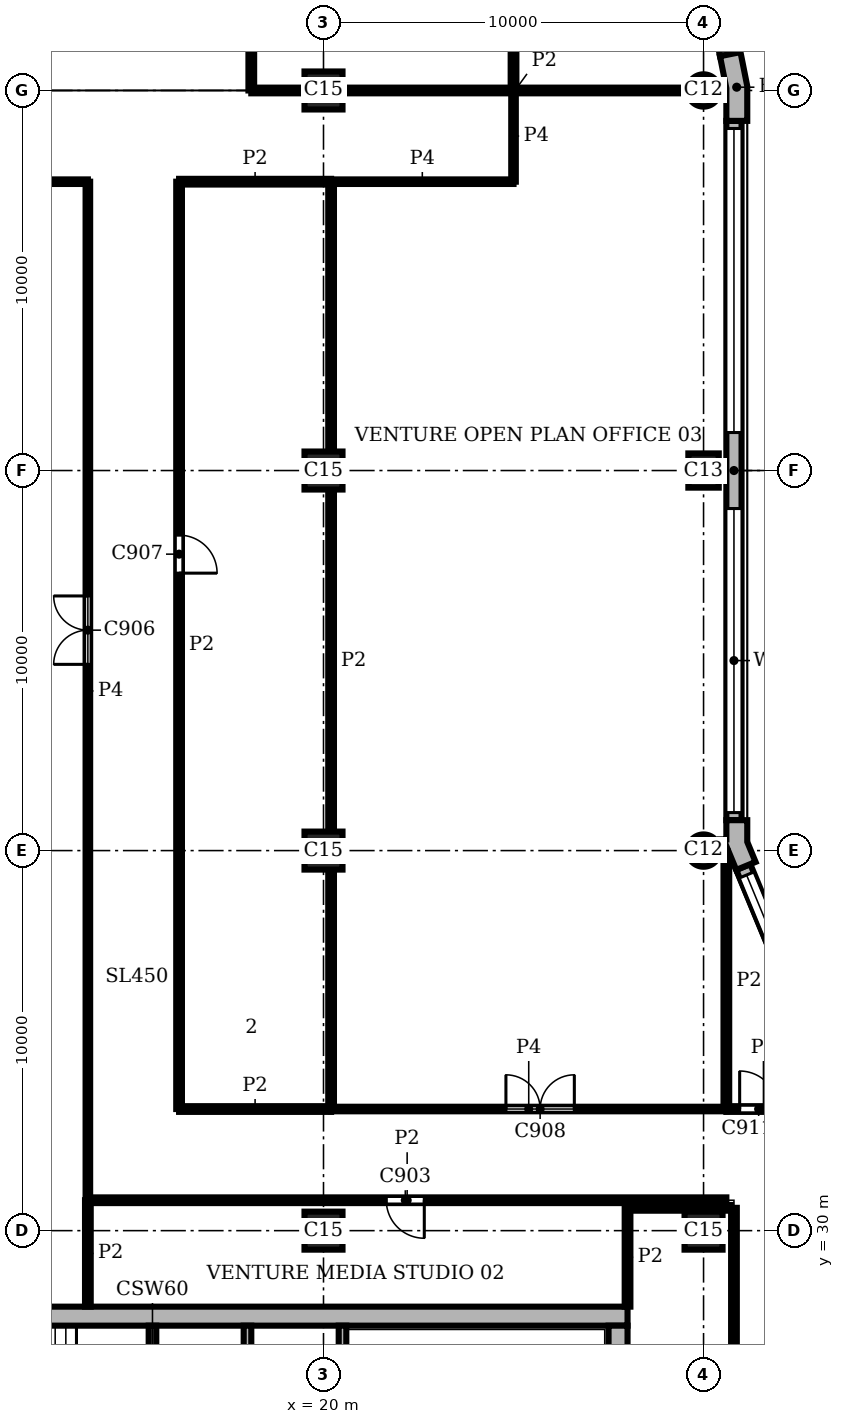
"""IFC4 building model, lengths in metres.
Left out: names, types, materials, properties, quantities, classifications, styles, units other than length and angle.
Written with IfcOpenShell. Run it as: python <this file> out.ifc"""

import sys

from ifc_helpers import new_model, si_unit, direction, frame, frame_2d, origin, origin_2d, place, context, subcontext, project, spatial, polyline, rectangle, circle, outline, extrude, element, fill, save


model = new_model("IFC4")
c1 = context("Model", 3, precision=1e-05, world=origin(), true_north=direction((0.0, 1.0)))
c2 = subcontext(c1, "Body", "Model", "MODEL_VIEW")
j1 = project(units=[si_unit("LENGTHUNIT", "METRE"), si_unit("PLANEANGLEUNIT", "RADIAN")], contexts=[c1])
p1 = place(None, origin())
s1 = spatial("IfcSite", under=j1, at=p1, CompositionType="ELEMENT")
p2 = place(p1, origin())
s2 = spatial("IfcBuilding", under=s1, at=p2, CompositionType="ELEMENT")
p3 = place(p2, frame((0.0, 0.0, 333.3)))
s3 = spatial("IfcBuildingStorey", under=s2, at=p3, CompositionType="ELEMENT", Elevation=333.3)
p4 = place(p3, frame((30.0, 40.0, 0.0), z_axis=(0.0, 0.0, 1.0), x_axis=(1.0, 0.0, 0.0)))
e1 = element("IfcColumn", 1, at=p4, inside=s3, PredefinedType="COLUMN", context=c2, shape_type="SweptSolid", body=[
    extrude(circle(Radius=0.425, at=origin_2d()), origin(), (0.0, 0.0, 1.0), 3.9),
])
p5 = place(p3, frame((30.0, 50.0, 0.0), z_axis=(0.0, 0.0, 1.0), x_axis=(0.0, 1.0, 0.0)))
e2 = element("IfcColumn", 2, at=p5, inside=s3, PredefinedType="COLUMN", context=c2, shape_type="SweptSolid", body=[
    extrude(rectangle(XDim=0.9, YDim=0.8, at=origin_2d()), origin(), (0.0, 0.0, 1.0), 3.9),
])
p6 = place(p3, frame((30.0, 60.0, 0.0), z_axis=(0.0, 0.0, 1.0), x_axis=(1.0, 0.0, 0.0)))
e3 = element("IfcColumn", 3, at=p6, inside=s3, PredefinedType="COLUMN", context=c2, shape_type="SweptSolid", body=[
    extrude(circle(Radius=0.425, at=origin_2d()), origin(), (0.0, 0.0, 1.0), 3.9),
])
for number, where, z_axis, x_axis in (
    (4, (20.0, 30.0, 0.0), (0.0, 0.0, 1.0), (1.0, 0.0, 0.0)),
    (5, (20.0, 40.0, 0.0), (0.0, 0.0, 1.0), (1.0, 0.0, 0.0)),
    (6, (20.0, 50.0, 0.0), (0.0, 0.0, 1.0), (1.0, 0.0, 0.0)),
    (7, (20.0, 60.0, 0.0), (0.0, 0.0, 1.0), (1.0, 0.0, 0.0)),
    (8, (30.0, 30.0, 0.0), (0.0, 0.0, 1.0), (1.0, 0.0, 0.0)),
):
    element("IfcColumn", number, at=place(p3, frame(where, z_axis=z_axis, x_axis=x_axis)), inside=s3, PredefinedType="COLUMN", context=c2, shape_type="SweptSolid", body=[
        extrude(rectangle(XDim=1.0, YDim=1.0, at=origin_2d()), origin(), (0.0, 0.0, 1.0), 3.9),
    ])
p7 = place(p3, frame((27.75, 8.5, 0.0), z_axis=(0.0, 0.0, 1.0), x_axis=(0.0, 1.0, 0.0)))
e9 = element("IfcWall", 9, at=p7, inside=s3, PredefinedType="SHEAR", context=c2, shape_type="SweptSolid", body=[
    extrude(rectangle(XDim=19.0, YDim=0.5, at=frame_2d((9.5, 0.0))), origin(), (0.0, 0.0, 1.0), 3.9),
])
p8 = place(p7, frame((4.95, 0.0, 0.0)))
e10 = element("IfcOpeningElement", 10, at=p8, cuts=e9, PredefinedType="OPENING", context=c2, shape_type="SweptSolid", body=[
    extrude(rectangle(XDim=1.6, YDim=2.1, at=frame_2d((0.8, 1.05))), frame((0.0, 0.26, 0.0), z_axis=(0.0, -1.0, 0.0), x_axis=(1.0, 0.0, 0.0)), (0.0, 0.0, 1.0), 0.52),
])
p9 = place(p3, frame((28.0, 27.75, 0.0), z_axis=(0.0, 0.0, 1.0), x_axis=(-1.0, 0.0, 0.0)))
e11 = element("IfcWall", 11, at=p9, inside=s3, PredefinedType="SHEAR", context=c2, shape_type="SweptSolid", body=[
    extrude(rectangle(XDim=20.0, YDim=0.5, at=frame_2d((10.0, 0.0))), origin(), (0.0, 0.0, 1.0), 3.9),
])
p10 = place(p3, origin())
e12 = element("IfcWall", 12, at=p10, inside=s3, PredefinedType="SOLIDWALL", context=c2, shape_type="SweptSolid", body=[
    extrude(outline(polyline([(30.62, 39.995), (30.62, 40.071), (30.861, 39.49), (31.23, 39.644), (31.369, 39.701), (31.15, 40.229), (31.15, 40.8), (31.0, 40.8), (30.6, 40.8), (30.6, 40.295), (30.425, 40.295), (30.425, 39.995), (30.62, 39.995)])), origin(), (0.0, 0.0, 1.0), 3.9),
])
e13 = element("IfcWall", 13, at=p10, inside=s3, PredefinedType="SOLIDWALL", context=c2, shape_type="SweptSolid", body=[
    extrude(outline(polyline([(31.0, 59.2), (31.15, 59.2), (31.15, 60.113), (30.972, 61.009), (30.825, 60.98), (30.432, 60.902), (30.6, 60.059), (30.6, 59.2), (31.0, 59.2)])), origin(), (0.0, 0.0, 1.0), 3.9),
])
p11 = place(p3, frame((33.362, 33.974, 0.0), z_axis=(0.0, 0.0, 1.0), x_axis=(-0.382655745237, 0.923891000409, 0.0)))
e14 = element("IfcWall", 14, at=p11, inside=s3, PredefinedType="SOLIDWALL", context=c2, shape_type="SweptSolid", body=[
    extrude(rectangle(XDim=6.053, YDim=0.4, at=frame_2d((3.027, 0.0))), origin(), (0.0, 0.0, 1.0), 3.9),
])
p12 = place(p11, frame((0.227, 0.0, 0.9)))
e15 = element("IfcOpeningElement", 15, at=p12, cuts=e14, PredefinedType="OPENING", context=c2, shape_type="SweptSolid", body=[
    extrude(rectangle(XDim=5.6, YDim=2.35, at=frame_2d((2.8, 1.175))), frame((0.0, 0.21, 0.0), z_axis=(0.0, -1.0, 0.0), x_axis=(1.0, 0.0, 0.0)), (0.0, 0.0, 1.0), 0.42),
])
p13 = place(p3, frame((30.8, 40.8, 0.0), z_axis=(0.0, 0.0, 1.0), x_axis=(0.0, 1.0, 0.0)))
e16 = element("IfcWall", 16, at=p13, inside=s3, PredefinedType="SOLIDWALL", context=c2, shape_type="SweptSolid", body=[
    extrude(rectangle(XDim=18.4, YDim=0.4, at=frame_2d((9.2, 0.0))), origin(), (0.0, 0.0, 1.0), 3.9),
])
p14 = place(p13, frame((0.2, 0.0, 0.9)))
e17 = element("IfcOpeningElement", 17, at=p14, cuts=e16, PredefinedType="OPENING", context=c2, shape_type="SweptSolid", body=[
    extrude(rectangle(XDim=8.0, YDim=2.35, at=frame_2d((4.0, 1.175))), frame((0.0, 0.21, 0.0), z_axis=(0.0, -1.0, 0.0), x_axis=(1.0, 0.0, 0.0)), (0.0, 0.0, 1.0), 0.42),
])
p15 = place(p13, frame((10.2, 0.0, 0.9)))
e18 = element("IfcOpeningElement", 18, at=p15, cuts=e16, PredefinedType="OPENING", context=c2, shape_type="SweptSolid", body=[
    extrude(rectangle(XDim=8.0, YDim=2.35, at=frame_2d((4.0, 1.175))), frame((0.0, 0.21, 0.0), z_axis=(0.0, -1.0, 0.0), x_axis=(1.0, 0.0, 0.0)), (0.0, 0.0, 1.0), 0.42),
])
p16 = place(p3, frame((30.629, 60.941, 0.0), z_axis=(0.0, 0.0, 1.0), x_axis=(-0.195098533057, 0.98078364709, 0.0)))
e19 = element("IfcWall", 19, at=p16, inside=s3, PredefinedType="SOLIDWALL", context=c2, shape_type="SweptSolid", body=[
    extrude(rectangle(XDim=4.753, YDim=0.4, at=frame_2d((2.376, 0.0))), origin(), (0.0, 0.0, 1.0), 3.9),
])
p17 = place(p16, frame((0.226, 0.0, 0.9)))
e20 = element("IfcOpeningElement", 20, at=p17, cuts=e19, PredefinedType="OPENING", context=c2, shape_type="SweptSolid", body=[
    extrude(rectangle(XDim=4.3, YDim=2.35, at=frame_2d((2.15, 1.175))), frame((0.0, 0.21, 0.0), z_axis=(0.0, -1.0, 0.0), x_axis=(1.0, 0.0, 0.0)), (0.0, 0.0, 1.0), 0.42),
])
p18 = place(p3, frame((15.5, 23.6, 0.0), z_axis=(0.0, 0.0, 1.0), x_axis=(0.0, 1.0, 0.0)))
e21 = element("IfcWall", 21, at=p18, inside=s3, PredefinedType="SHEAR", context=c2, shape_type="SweptSolid", body=[
    extrude(rectangle(XDim=3.9, YDim=0.2, at=frame_2d((1.95, 0.0))), origin(), (0.0, 0.0, 1.0), 3.58),
])
p19 = place(p3, frame((18.0, 20.0, 0.0), z_axis=(0.0, 0.0, 1.0), x_axis=(0.0, 1.0, 0.0)))
e22 = element("IfcWall", 22, at=p19, inside=s3, PredefinedType="SHEAR", context=c2, shape_type="SweptSolid", body=[
    extrude(rectangle(XDim=7.5, YDim=0.2, at=frame_2d((3.75, 0.0))), origin(), (0.0, 0.0, 1.0), 3.58),
])
p20 = place(p19, frame((1.2, 0.0, 0.0)))
e23 = element("IfcOpeningElement", 23, at=p20, cuts=e22, PredefinedType="OPENING", context=c2, shape_type="SweptSolid", body=[
    extrude(rectangle(XDim=1.2, YDim=2.1, at=frame_2d((0.6, 1.05))), frame((0.0, 0.11, 0.0), z_axis=(0.0, -1.0, 0.0), x_axis=(1.0, 0.0, 0.0)), (0.0, 0.0, 1.0), 0.22),
])
p21 = place(p3, frame((20.5, 23.6, 0.0), z_axis=(0.0, 0.0, 1.0), x_axis=(0.0, 1.0, 0.0)))
e24 = element("IfcWall", 24, at=p21, inside=s3, PredefinedType="SHEAR", context=c2, shape_type="SweptSolid", body=[
    extrude(rectangle(XDim=3.9, YDim=0.2, at=frame_2d((1.95, 0.0))), origin(), (0.0, 0.0, 1.0), 3.58),
])
p22 = place(p3, frame((13.8, 28.0, 0.0), z_axis=(0.0, 0.0, 1.0), x_axis=(0.0, 1.0, 0.0)))
e25 = element("IfcWall", 25, at=p22, inside=s3, PredefinedType="PARTITIONING", context=c2, shape_type="SweptSolid", body=[
    extrude(rectangle(XDim=2.801, YDim=0.15, at=frame_2d((1.4, 0.0))), origin(), (0.0, 0.0, 1.0), 3.58),
])
p23 = place(p3, frame((16.2, 33.2, 0.0), z_axis=(0.0, 0.0, 1.0), x_axis=(0.0, 1.0, 0.0)))
e26 = element("IfcWall", 26, at=p23, inside=s3, PredefinedType="PARTITIONING", context=c2, shape_type="SweptSolid", body=[
    extrude(rectangle(XDim=24.4, YDim=0.15, at=frame_2d((12.2, 0.0))), origin(), (0.0, 0.0, 1.0), 3.58),
])
p24 = place(p23, frame((14.1, 0.0, 0.0)))
e27 = element("IfcOpeningElement", 27, at=p24, cuts=e26, PredefinedType="OPENING", context=c2, shape_type="SweptSolid", body=[
    extrude(rectangle(XDim=1.0, YDim=2.1, at=frame_2d((0.5, 1.05))), frame((0.0, 0.085, 0.0), z_axis=(0.0, -1.0, 0.0), x_axis=(1.0, 0.0, 0.0)), (0.0, 0.0, 1.0), 0.17),
])
p25 = place(p3, frame((18.1, 60.0, 0.0), z_axis=(0.0, 0.0, 1.0), x_axis=(0.0, 1.0, 0.0)))
e28 = element("IfcWall", 28, at=p25, inside=s3, PredefinedType="PARTITIONING", context=c2, shape_type="SweptSolid", body=[
    extrude(rectangle(XDim=6.4, YDim=0.15, at=frame_2d((3.2, 0.0))), origin(), (0.0, 0.0, 1.0), 3.58),
])
p26 = place(p25, frame((3.1, 0.0, 0.0)))
e29 = element("IfcOpeningElement", 29, at=p26, cuts=e28, PredefinedType="OPENING", context=c2, shape_type="SweptSolid", body=[
    extrude(rectangle(XDim=1.0, YDim=2.1, at=frame_2d((0.5, 1.05))), frame((0.0, 0.085, 0.0), z_axis=(0.0, -1.0, 0.0), x_axis=(1.0, 0.0, 0.0)), (0.0, 0.0, 1.0), 0.17),
])
p27 = place(p3, frame((20.2, 33.2, 0.0), z_axis=(0.0, 0.0, 1.0), x_axis=(0.0, 1.0, 0.0)))
e30 = element("IfcWall", 30, at=p27, inside=s3, PredefinedType="PARTITIONING", context=c2, shape_type="SweptSolid", body=[
    extrude(rectangle(XDim=6.3, YDim=0.15, at=frame_2d((3.15, 0.0))), origin(), (0.0, 0.0, 1.0), 3.58),
])
p28 = place(p3, frame((20.2, 40.5, 0.0), z_axis=(0.0, 0.0, 1.0), x_axis=(0.0, 1.0, 0.0)))
e31 = element("IfcWall", 31, at=p28, inside=s3, PredefinedType="PARTITIONING", context=c2, shape_type="SweptSolid", body=[
    extrude(rectangle(XDim=9.0, YDim=0.15, at=frame_2d((4.5, 0.0))), origin(), (0.0, 0.0, 1.0), 3.58),
])
p29 = place(p3, frame((20.2, 50.5, 0.0), z_axis=(0.0, 0.0, 1.0), x_axis=(0.0, 1.0, 0.0)))
e32 = element("IfcWall", 32, at=p29, inside=s3, PredefinedType="PARTITIONING", context=c2, shape_type="SweptSolid", body=[
    extrude(rectangle(XDim=7.1, YDim=0.15, at=frame_2d((3.55, 0.0))), origin(), (0.0, 0.0, 1.0), 3.58),
])
p30 = place(p3, frame((25.0, 60.0, 0.0), z_axis=(0.0, 0.0, 1.0), x_axis=(0.0, 1.0, 0.0)))
e33 = element("IfcWall", 33, at=p30, inside=s3, PredefinedType="PARTITIONING", context=c2, shape_type="SweptSolid", body=[
    extrude(rectangle(XDim=8.0, YDim=0.15, at=frame_2d((4.0, 0.0))), origin(), (0.0, 0.0, 1.0), 3.58),
])
p31 = place(p3, frame((28.0, 28.0, 0.0), z_axis=(0.0, 0.0, 1.0), x_axis=(0.0, 1.0, 0.0)))
e34 = element("IfcWall", 34, at=p31, inside=s3, PredefinedType="PARTITIONING", context=c2, shape_type="SweptSolid", body=[
    extrude(rectangle(XDim=2.598, YDim=0.15, at=frame_2d((1.299, 0.0))), origin(), (0.0, 0.0, 1.0), 3.58),
])
p32 = place(p3, frame((30.6, 33.2, 0.0), z_axis=(0.0, 0.0, 1.0), x_axis=(0.0, 1.0, 0.0)))
e35 = element("IfcWall", 35, at=p32, inside=s3, PredefinedType="PARTITIONING", context=c2, shape_type="SweptSolid", body=[
    extrude(rectangle(XDim=6.738, YDim=0.15, at=frame_2d((3.369, 0.0))), origin(), (0.0, 0.0, 1.0), 3.58),
])
p33 = place(p3, frame((30.8, 15.45, 0.0), z_axis=(0.0, 0.0, 1.0), x_axis=(0.0, 1.0, 0.0)))
e36 = element("IfcWall", 36, at=p33, inside=s3, PredefinedType="PARTITIONING", context=c2, shape_type="SweptSolid", body=[
    extrude(rectangle(XDim=15.15, YDim=0.15, at=frame_2d((7.575, 0.0))), origin(), (0.0, 0.0, 1.0), 3.58),
])
p34 = place(p33, frame((2.35, 0.0, 0.0)))
e37 = element("IfcOpeningElement", 37, at=p34, cuts=e36, PredefinedType="OPENING", context=c2, shape_type="SweptSolid", body=[
    extrude(rectangle(XDim=1.0, YDim=2.1, at=frame_2d((0.5, 1.05))), frame((0.0, 0.085, 0.0), z_axis=(0.0, -1.0, 0.0), x_axis=(1.0, 0.0, 0.0)), (0.0, 0.0, 1.0), 0.17),
])
p35 = place(p33, frame((10.35, 0.0, 0.0)))
e38 = element("IfcOpeningElement", 38, at=p35, cuts=e36, PredefinedType="OPENING", context=c2, shape_type="SweptSolid", body=[
    extrude(rectangle(XDim=1.0, YDim=2.1, at=frame_2d((0.5, 1.05))), frame((0.0, 0.085, 0.0), z_axis=(0.0, -1.0, 0.0), x_axis=(1.0, 0.0, 0.0)), (0.0, 0.0, 1.0), 0.17),
])
p36 = place(p3, frame((28.002, 30.6, 0.0), z_axis=(0.0, 0.0, 1.0), x_axis=(1.0, 0.0, 0.0)))
e39 = element("IfcWall", 39, at=p36, inside=s3, PredefinedType="PARTITIONING", context=c2, shape_type="SweptSolid", body=[
    extrude(rectangle(XDim=2.723, YDim=0.15, at=frame_2d((1.362, 0.0))), origin(), (0.0, 0.0, 1.0), 3.58),
])
p37 = place(p3, frame((13.802, 30.8, 0.0), z_axis=(0.0, 0.0, 1.0), x_axis=(1.0, 0.0, 0.0)))
e40 = element("IfcWall", 40, at=p37, inside=s3, PredefinedType="PARTITIONING", context=c2, shape_type="SweptSolid", body=[
    extrude(rectangle(XDim=16.798, YDim=0.15, at=frame_2d((8.399, 0.0))), origin(), (0.0, 0.0, 1.0), 3.58),
])
p38 = place(p37, frame((7.85, 0.0, 0.0)))
e41 = element("IfcOpeningElement", 41, at=p38, cuts=e40, PredefinedType="OPENING", context=c2, shape_type="SweptSolid", body=[
    extrude(rectangle(XDim=1.0, YDim=2.1, at=frame_2d((0.5, 1.05))), frame((0.0, 0.085, 0.0), z_axis=(0.0, -1.0, 0.0), x_axis=(1.0, 0.0, 0.0)), (0.0, 0.0, 1.0), 0.17),
])
p39 = place(p3, frame((16.2, 33.2, 0.0), z_axis=(0.0, 0.0, 1.0), x_axis=(1.0, 0.0, 0.0)))
e42 = element("IfcWall", 42, at=p39, inside=s3, PredefinedType="PARTITIONING", context=c2, shape_type="SweptSolid", body=[
    extrude(rectangle(XDim=4.0, YDim=0.15, at=frame_2d((2.0, 0.0))), origin(), (0.0, 0.0, 1.0), 3.58),
])
p40 = place(p3, frame((30.6, 33.2, 0.0), z_axis=(0.0, 0.0, 1.0), x_axis=(1.0, 0.0, 0.0)))
e43 = element("IfcWall", 43, at=p40, inside=s3, PredefinedType="PARTITIONING", context=c2, shape_type="SweptSolid", body=[
    extrude(rectangle(XDim=1.952, YDim=0.15, at=frame_2d((0.976, 0.0))), origin(), (0.0, 0.0, 1.0), 3.58),
])
p41 = place(p40, frame((0.35, 0.0, 0.0)))
e44 = element("IfcOpeningElement", 44, at=p41, cuts=e43, PredefinedType="OPENING", context=c2, shape_type="SweptSolid", body=[
    extrude(rectangle(XDim=1.0, YDim=2.1, at=frame_2d((0.5, 1.05))), frame((0.0, 0.085, 0.0), z_axis=(0.0, -1.0, 0.0), x_axis=(1.0, 0.0, 0.0)), (0.0, 0.0, 1.0), 0.17),
])
p42 = place(p3, frame((16.2, 57.6, 0.0), z_axis=(0.0, 0.0, 1.0), x_axis=(1.0, 0.0, 0.0)))
e45 = element("IfcWall", 45, at=p42, inside=s3, PredefinedType="PARTITIONING", context=c2, shape_type="SweptSolid", body=[
    extrude(rectangle(XDim=4.0, YDim=0.15, at=frame_2d((2.0, 0.0))), origin(), (0.0, 0.0, 1.0), 3.58),
])
p43 = place(p3, frame((18.1, 60.0, 0.0), z_axis=(0.0, 0.0, 1.0), x_axis=(1.0, 0.0, 0.0)))
e46 = element("IfcWall", 46, at=p43, inside=s3, PredefinedType="PARTITIONING", context=c2, shape_type="SweptSolid", body=[
    extrude(rectangle(XDim=1.4, YDim=0.15, at=frame_2d((0.7, 0.0))), origin(), (0.0, 0.0, 1.0), 3.58),
])
p44 = place(p3, frame((20.5, 60.0, 0.0), z_axis=(0.0, 0.0, 1.0), x_axis=(1.0, 0.0, 0.0)))
e47 = element("IfcWall", 47, at=p44, inside=s3, PredefinedType="PARTITIONING", context=c2, shape_type="SweptSolid", body=[
    extrude(rectangle(XDim=9.075, YDim=0.15, at=frame_2d((4.538, 0.0))), origin(), (0.0, 0.0, 1.0), 3.58),
])
p45 = place(p3, frame((13.8, 30.8, 0.0), z_axis=(0.0, 0.0, 1.0), x_axis=(0.0, 1.0, 0.0)))
e48 = element("IfcWall", 48, at=p45, inside=s3, PredefinedType="PARTITIONING", context=c2, shape_type="SweptSolid", body=[
    extrude(rectangle(XDim=26.8, YDim=0.12, at=frame_2d((13.4, 0.0))), origin(), (0.0, 0.0, 1.0), 3.58),
])
p46 = place(p45, frame((14.1, 0.0, 0.0)))
e49 = element("IfcOpeningElement", 49, at=p46, cuts=e48, PredefinedType="OPENING", context=c2, shape_type="SweptSolid", body=[
    extrude(rectangle(XDim=1.8, YDim=2.1, at=frame_2d((0.9, 1.05))), frame((0.0, 0.07, 0.0), z_axis=(0.0, -1.0, 0.0), x_axis=(1.0, 0.0, 0.0)), (0.0, 0.0, 1.0), 0.14),
])
p47 = place(p3, frame((25.0, 57.6, 0.0), z_axis=(0.0, 0.0, 1.0), x_axis=(0.0, 1.0, 0.0)))
e50 = element("IfcWall", 50, at=p47, inside=s3, PredefinedType="PARTITIONING", context=c2, shape_type="SweptSolid", body=[
    extrude(rectangle(XDim=2.4, YDim=0.12, at=frame_2d((1.2, 0.0))), origin(), (0.0, 0.0, 1.0), 3.58),
])
p48 = place(p3, frame((20.2, 33.2, 0.0), z_axis=(0.0, 0.0, 1.0), x_axis=(1.0, 0.0, 0.0)))
e51 = element("IfcWall", 51, at=p48, inside=s3, PredefinedType="PARTITIONING", context=c2, shape_type="SweptSolid", body=[
    extrude(rectangle(XDim=10.4, YDim=0.12, at=frame_2d((5.2, 0.0))), origin(), (0.0, 0.0, 1.0), 3.58),
])
p49 = place(p48, frame((4.6, 0.0, 0.0)))
e52 = element("IfcOpeningElement", 52, at=p49, cuts=e51, PredefinedType="OPENING", context=c2, shape_type="SweptSolid", body=[
    extrude(rectangle(XDim=1.8, YDim=2.1, at=frame_2d((0.9, 1.05))), frame((0.0, 0.07, 0.0), z_axis=(0.0, -1.0, 0.0), x_axis=(1.0, 0.0, 0.0)), (0.0, 0.0, 1.0), 0.14),
])
p50 = place(p3, frame((5.0, 57.6, 0.0), z_axis=(0.0, 0.0, 1.0), x_axis=(1.0, 0.0, 0.0)))
e53 = element("IfcWall", 53, at=p50, inside=s3, PredefinedType="PARTITIONING", context=c2, shape_type="SweptSolid", body=[
    extrude(rectangle(XDim=8.8, YDim=0.12, at=frame_2d((4.4, 0.0))), origin(), (0.0, 0.0, 1.0), 3.58),
])
p51 = place(p3, frame((20.2, 57.6, 0.0), z_axis=(0.0, 0.0, 1.0), x_axis=(1.0, 0.0, 0.0)))
e54 = element("IfcWall", 54, at=p51, inside=s3, PredefinedType="PARTITIONING", context=c2, shape_type="SweptSolid", body=[
    extrude(rectangle(XDim=4.8, YDim=0.12, at=frame_2d((2.4, 0.0))), origin(), (0.0, 0.0, 1.0), 3.58),
])
p52 = place(p12, origin())
e55 = element("IfcWindow", 55, at=p52, inside=s3, PartitioningType="SINGLE_PANEL", PredefinedType="WINDOW", context=c2, shape_type="SweptSolid", body=[
    extrude(rectangle(XDim=5.6, YDim=2.35, at=frame_2d((2.8, 1.175))), frame((0.0, 0.16, 0.0), z_axis=(0.0, -1.0, 0.0), x_axis=(1.0, 0.0, 0.0)), (0.0, 0.0, 1.0), 0.06),
])
fill(e15, e55)
p53 = place(p14, origin())
e56 = element("IfcWindow", 56, at=p53, inside=s3, PartitioningType="SINGLE_PANEL", PredefinedType="WINDOW", context=c2, shape_type="SweptSolid", body=[
    extrude(rectangle(XDim=8.0, YDim=2.35, at=frame_2d((4.0, 1.175))), frame((0.0, 0.16, 0.0), z_axis=(0.0, -1.0, 0.0), x_axis=(1.0, 0.0, 0.0)), (0.0, 0.0, 1.0), 0.06),
])
fill(e17, e56)
p54 = place(p15, origin())
e57 = element("IfcWindow", 57, at=p54, inside=s3, PartitioningType="SINGLE_PANEL", PredefinedType="WINDOW", context=c2, shape_type="SweptSolid", body=[
    extrude(rectangle(XDim=8.0, YDim=2.35, at=frame_2d((4.0, 1.175))), frame((0.0, 0.16, 0.0), z_axis=(0.0, -1.0, 0.0), x_axis=(1.0, 0.0, 0.0)), (0.0, 0.0, 1.0), 0.06),
])
fill(e18, e57)
p55 = place(p38, frame((1.0, 0.0, 0.0), z_axis=(0.0, 0.0, 1.0), x_axis=(-1.0, 0.0, 0.0)))
e58 = element("IfcDoor", 58, at=p55, inside=s3, OperationType="SINGLE_SWING_LEFT", PredefinedType="DOOR", context=c2, shape_type="SweptSolid", body=[
    extrude(rectangle(XDim=1.0, YDim=2.1, at=frame_2d((0.5, 1.05))), frame((0.0, 0.025, 0.0), z_axis=(0.0, -1.0, 0.0), x_axis=(1.0, 0.0, 0.0)), (0.0, 0.0, 1.0), 0.05),
])
fill(e41, e58)
p56 = place(p46, origin())
e59 = element("IfcDoor", 59, at=p56, inside=s3, OperationType="DOUBLE_DOOR_SINGLE_SWING", PredefinedType="DOOR", context=c2, shape_type="SweptSolid", body=[
    extrude(rectangle(XDim=1.8, YDim=2.1, at=frame_2d((0.9, 1.05))), frame((0.0, 0.025, 0.0), z_axis=(0.0, -1.0, 0.0), x_axis=(1.0, 0.0, 0.0)), (0.0, 0.0, 1.0), 0.05),
])
fill(e49, e59)
p57 = place(p24, frame((1.0, 0.0, 0.0), z_axis=(0.0, 0.0, 1.0), x_axis=(-1.0, 0.0, 0.0)))
e60 = element("IfcDoor", 60, at=p57, inside=s3, OperationType="SINGLE_SWING_RIGHT", PredefinedType="DOOR", context=c2, shape_type="SweptSolid", body=[
    extrude(rectangle(XDim=1.0, YDim=2.1, at=frame_2d((0.5, 1.05))), frame((0.0, 0.025, 0.0), z_axis=(0.0, -1.0, 0.0), x_axis=(1.0, 0.0, 0.0)), (0.0, 0.0, 1.0), 0.05),
])
fill(e27, e60)
p58 = place(p49, origin())
e61 = element("IfcDoor", 61, at=p58, inside=s3, OperationType="DOUBLE_DOOR_SINGLE_SWING", PredefinedType="DOOR", context=c2, shape_type="SweptSolid", body=[
    extrude(rectangle(XDim=1.8, YDim=2.1, at=frame_2d((0.9, 1.05))), frame((0.0, 0.025, 0.0), z_axis=(0.0, -1.0, 0.0), x_axis=(1.0, 0.0, 0.0)), (0.0, 0.0, 1.0), 0.05),
])
fill(e52, e61)
p59 = place(p41, origin())
e62 = element("IfcDoor", 62, at=p59, inside=s3, OperationType="SINGLE_SWING_LEFT", PredefinedType="DOOR", context=c2, shape_type="SweptSolid", body=[
    extrude(rectangle(XDim=1.0, YDim=2.1, at=frame_2d((0.5, 1.05))), frame((0.0, 0.025, 0.0), z_axis=(0.0, -1.0, 0.0), x_axis=(1.0, 0.0, 0.0)), (0.0, 0.0, 1.0), 0.05),
])
fill(e44, e62)
save(model, sys.argv[1])
